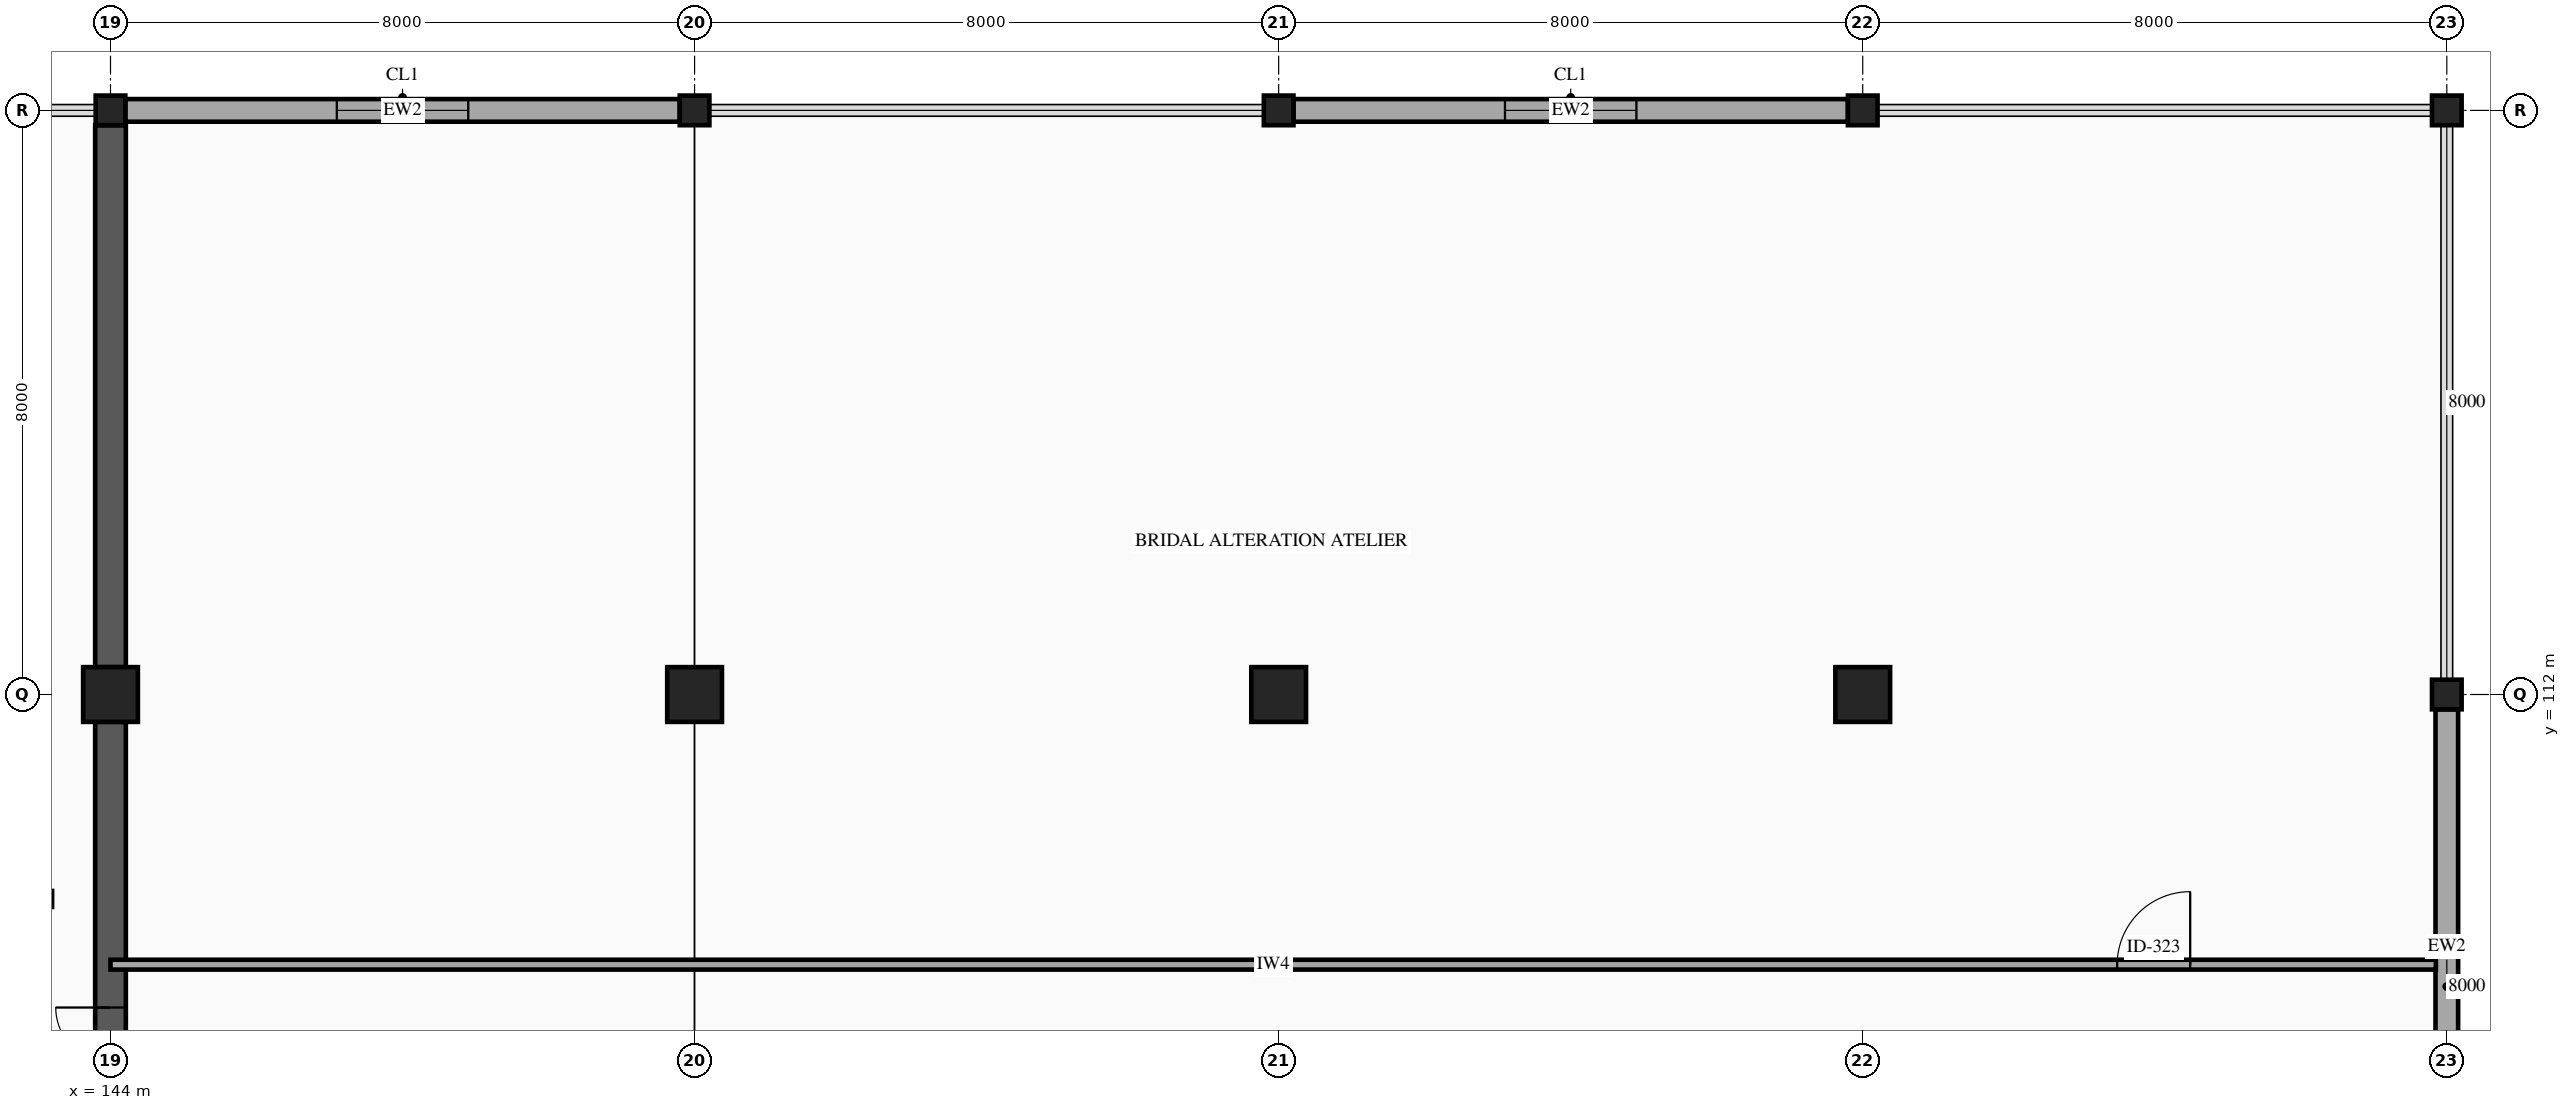
"""IFC4 building model, lengths in metres.
Left out: names, types, materials, properties, quantities, classifications, styles, units other than length and angle.
Written with IfcOpenShell. Run it as: python <this file> out.ifc"""

import sys

from ifc_helpers import new_model, si_unit, direction, frame, frame_2d, origin, origin_2d, place, context, subcontext, project, spatial, rectangle, hollow_rectangle, extrude, element, fill, save


model = new_model("IFC4")
c1 = context("Model", 3, precision=1e-05, world=origin(), true_north=direction((0.0, 1.0)))
c2 = subcontext(c1, "Body", "Model", "MODEL_VIEW")
j1 = project(units=[si_unit("LENGTHUNIT", "METRE"), si_unit("PLANEANGLEUNIT", "RADIAN")], contexts=[c1])
p1 = place(None, origin())
s1 = spatial("IfcSite", under=j1, at=p1, CompositionType="ELEMENT")
p2 = place(p1, origin())
s2 = spatial("IfcBuilding", under=s1, at=p2, CompositionType="ELEMENT")
p3 = place(p2, frame((0.0, 0.0, 10.4)))
s3 = spatial("IfcBuildingStorey", under=s2, at=p3, CompositionType="ELEMENT", Elevation=10.4)
p4 = place(p3, frame((144.0, 112.0, 0.0), z_axis=(0.0, 0.0, 1.0), x_axis=(1.0, 0.0, 0.0)))
e1 = element("IfcColumn", 1, at=p4, inside=s3, PredefinedType="COLUMN", context=c2, shape_type="SweptSolid", body=[
    extrude(rectangle(XDim=0.75, YDim=0.75, at=origin_2d()), origin(), (0.0, 0.0, 1.0), 4.5),
])
p5 = place(p3, frame((144.0, 120.0, 0.0), z_axis=(0.0, 0.0, 1.0), x_axis=(1.0, 0.0, 0.0)))
e2 = element("IfcColumn", 2, at=p5, inside=s3, PredefinedType="COLUMN", context=c2, shape_type="SweptSolid", body=[
    extrude(hollow_rectangle(XDim=0.406, YDim=0.406, WallThickness=0.015, InnerFilletRadius=0.015, OuterFilletRadius=0.029, at=origin_2d()), origin(), (0.0, 0.0, 1.0), 4.5),
])
p6 = place(p3, frame((152.0, 112.0, 0.0), z_axis=(0.0, 0.0, 1.0), x_axis=(1.0, 0.0, 0.0)))
e3 = element("IfcColumn", 3, at=p6, inside=s3, PredefinedType="COLUMN", context=c2, shape_type="SweptSolid", body=[
    extrude(rectangle(XDim=0.75, YDim=0.75, at=origin_2d()), origin(), (0.0, 0.0, 1.0), 4.5),
])
p7 = place(p3, frame((152.0, 120.0, 0.0), z_axis=(0.0, 0.0, 1.0), x_axis=(1.0, 0.0, 0.0)))
e4 = element("IfcColumn", 4, at=p7, inside=s3, PredefinedType="COLUMN", context=c2, shape_type="SweptSolid", body=[
    extrude(hollow_rectangle(XDim=0.406, YDim=0.406, WallThickness=0.015, InnerFilletRadius=0.015, OuterFilletRadius=0.029, at=origin_2d()), origin(), (0.0, 0.0, 1.0), 4.5),
])
p8 = place(p3, frame((160.0, 112.0, 0.0), z_axis=(0.0, 0.0, 1.0), x_axis=(1.0, 0.0, 0.0)))
e5 = element("IfcColumn", 5, at=p8, inside=s3, PredefinedType="COLUMN", context=c2, shape_type="SweptSolid", body=[
    extrude(rectangle(XDim=0.75, YDim=0.75, at=origin_2d()), origin(), (0.0, 0.0, 1.0), 4.5),
])
p9 = place(p3, frame((160.0, 120.0, 0.0), z_axis=(0.0, 0.0, 1.0), x_axis=(1.0, 0.0, 0.0)))
e6 = element("IfcColumn", 6, at=p9, inside=s3, PredefinedType="COLUMN", context=c2, shape_type="SweptSolid", body=[
    extrude(hollow_rectangle(XDim=0.406, YDim=0.406, WallThickness=0.015, InnerFilletRadius=0.015, OuterFilletRadius=0.029, at=origin_2d()), origin(), (0.0, 0.0, 1.0), 4.5),
])
p10 = place(p3, frame((168.0, 112.0, 0.0), z_axis=(0.0, 0.0, 1.0), x_axis=(1.0, 0.0, 0.0)))
e7 = element("IfcColumn", 7, at=p10, inside=s3, PredefinedType="COLUMN", context=c2, shape_type="SweptSolid", body=[
    extrude(rectangle(XDim=0.75, YDim=0.75, at=origin_2d()), origin(), (0.0, 0.0, 1.0), 4.5),
])
for number, where, z_axis, x_axis in (
    (8, (168.0, 120.0, 0.0), (0.0, 0.0, 1.0), (1.0, 0.0, 0.0)),
    (9, (176.0, 112.0, 0.0), (0.0, 0.0, 1.0), (1.0, 0.0, 0.0)),
    (10, (176.0, 120.0, 0.0), (0.0, 0.0, 1.0), (1.0, 0.0, 0.0)),
):
    element("IfcColumn", number, at=place(p3, frame(where, z_axis=z_axis, x_axis=x_axis)), inside=s3, PredefinedType="COLUMN", context=c2, shape_type="SweptSolid", body=[
        extrude(hollow_rectangle(XDim=0.406, YDim=0.406, WallThickness=0.015, InnerFilletRadius=0.015, OuterFilletRadius=0.029, at=origin_2d()), origin(), (0.0, 0.0, 1.0), 4.5),
    ])
p11 = place(p3, frame((144.203, 120.0, 0.0), z_axis=(0.0, 0.0, 1.0), x_axis=(1.0, 0.0, 0.0)))
e11 = element("IfcWall", 11, at=p11, inside=s3, PredefinedType="STANDARD", context=c2, shape_type="SweptSolid", body=[
    extrude(rectangle(XDim=7.594, YDim=0.31, at=frame_2d((3.797, 0.0))), origin(), (0.0, 0.0, 1.0), 3.48),
])
p12 = place(p11, frame((2.897, 0.0, 0.8)))
e12 = element("IfcOpeningElement", 12, at=p12, cuts=e11, PredefinedType="OPENING", context=c2, shape_type="SweptSolid", body=[
    extrude(rectangle(XDim=1.8, YDim=2.4, at=frame_2d((0.9, 1.2))), frame((0.0, 0.165, 0.0), z_axis=(0.0, -1.0, 0.0), x_axis=(1.0, 0.0, 0.0)), (0.0, 0.0, 1.0), 0.33),
])
p13 = place(p3, frame((160.203, 120.0, 0.0), z_axis=(0.0, 0.0, 1.0), x_axis=(1.0, 0.0, 0.0)))
e13 = element("IfcWall", 13, at=p13, inside=s3, PredefinedType="STANDARD", context=c2, shape_type="SweptSolid", body=[
    extrude(rectangle(XDim=7.594, YDim=0.31, at=frame_2d((3.797, 0.0))), origin(), (0.0, 0.0, 1.0), 3.48),
])
p14 = place(p13, frame((2.897, 0.0, 0.8)))
e14 = element("IfcOpeningElement", 14, at=p14, cuts=e13, PredefinedType="OPENING", context=c2, shape_type="SweptSolid", body=[
    extrude(rectangle(XDim=1.8, YDim=2.4, at=frame_2d((0.9, 1.2))), frame((0.0, 0.165, 0.0), z_axis=(0.0, -1.0, 0.0), x_axis=(1.0, 0.0, 0.0)), (0.0, 0.0, 1.0), 0.33),
])
p15 = place(p3, frame((176.0, 111.797, 0.0), z_axis=(0.0, 0.0, 1.0), x_axis=(0.0, -1.0, 0.0)))
e15 = element("IfcWall", 15, at=p15, inside=s3, PredefinedType="STANDARD", context=c2, shape_type="SweptSolid", body=[
    extrude(rectangle(XDim=7.594, YDim=0.31, at=frame_2d((3.797, 0.0))), origin(), (0.0, 0.0, 1.0), 3.48),
])
p16 = place(p3, frame((144.0, 104.375, 0.0), z_axis=(0.0, 0.0, 1.0), x_axis=(0.0, 1.0, 0.0)))
e16 = element("IfcWall", 16, at=p16, inside=s3, PredefinedType="SHEAR", context=c2, shape_type="SweptSolid", body=[
    extrude(rectangle(XDim=7.25, YDim=0.42, at=frame_2d((3.625, 0.0))), origin(), (0.0, 0.0, 1.0), 4.28),
])
p17 = place(p16, frame((1.838, 0.0, 0.0)))
e17 = element("IfcOpeningElement", 17, at=p17, cuts=e16, PredefinedType="OPENING", context=c2, shape_type="SweptSolid", body=[
    extrude(rectangle(XDim=1.5, YDim=2.15, at=frame_2d((0.75, 1.075))), frame((0.0, 0.22, 0.0), z_axis=(0.0, -1.0, 0.0), x_axis=(1.0, 0.0, 0.0)), (0.0, 0.0, 1.0), 0.44),
])
p18 = place(p3, frame((144.0, 112.375, 0.0), z_axis=(0.0, 0.0, 1.0), x_axis=(0.0, 1.0, 0.0)))
e18 = element("IfcWall", 18, at=p18, inside=s3, PredefinedType="SHEAR", context=c2, shape_type="SweptSolid", body=[
    extrude(rectangle(XDim=7.422, YDim=0.42, at=frame_2d((3.711, 0.0))), origin(), (0.0, 0.0, 1.0), 4.28),
])
p19 = place(p3, frame((144.0, 108.3, 0.0), z_axis=(0.0, 0.0, 1.0), x_axis=(1.0, 0.0, 0.0)))
e19 = element("IfcWall", 19, at=p19, inside=s3, PredefinedType="PARTITIONING", context=c2, shape_type="SweptSolid", body=[
    extrude(rectangle(XDim=31.85, YDim=0.135, at=frame_2d((15.925, 0.0))), origin(), (0.0, 0.0, 1.0), 3.48),
])
p20 = place(p19, frame((27.485, 0.0, 0.0)))
e20 = element("IfcOpeningElement", 20, at=p20, cuts=e19, PredefinedType="OPENING", context=c2, shape_type="SweptSolid", body=[
    extrude(rectangle(XDim=1.0, YDim=2.15, at=frame_2d((0.5, 1.075))), frame((0.0, 0.077, 0.0), z_axis=(0.0, -1.0, 0.0), x_axis=(1.0, 0.0, 0.0)), (0.0, 0.0, 1.0), 0.155),
])
p21 = place(p12, origin())
e21 = element("IfcWindow", 21, at=p21, inside=s3, PartitioningType="DOUBLE_PANEL_HORIZONTAL", PredefinedType="WINDOW", context=c2, shape_type="SweptSolid", body=[
    extrude(rectangle(XDim=1.8, YDim=2.4, at=frame_2d((0.9, 1.2))), frame((0.0, 0.03, 0.0), z_axis=(0.0, -1.0, 0.0), x_axis=(1.0, 0.0, 0.0)), (0.0, 0.0, 1.0), 0.06),
])
fill(e12, e21)
p22 = place(p14, origin())
e22 = element("IfcWindow", 22, at=p22, inside=s3, PartitioningType="DOUBLE_PANEL_HORIZONTAL", PredefinedType="WINDOW", context=c2, shape_type="SweptSolid", body=[
    extrude(rectangle(XDim=1.8, YDim=2.4, at=frame_2d((0.9, 1.2))), frame((0.0, 0.03, 0.0), z_axis=(0.0, -1.0, 0.0), x_axis=(1.0, 0.0, 0.0)), (0.0, 0.0, 1.0), 0.06),
])
fill(e14, e22)
p23 = place(p17, origin())
e23 = element("IfcDoor", 23, at=p23, inside=s3, OperationType="DOUBLE_DOOR_SINGLE_SWING", PredefinedType="DOOR", context=c2, shape_type="SweptSolid", body=[
    extrude(rectangle(XDim=1.5, YDim=2.15, at=frame_2d((0.75, 1.075))), frame((0.0, 0.025, 0.0), z_axis=(0.0, -1.0, 0.0), x_axis=(1.0, 0.0, 0.0)), (0.0, 0.0, 1.0), 0.05),
])
fill(e17, e23)
p24 = place(p20, origin())
e24 = element("IfcDoor", 24, at=p24, inside=s3, OperationType="SINGLE_SWING_RIGHT", PredefinedType="DOOR", context=c2, shape_type="SweptSolid", body=[
    extrude(rectangle(XDim=1.0, YDim=2.15, at=frame_2d((0.5, 1.075))), frame((0.0, 0.025, 0.0), z_axis=(0.0, -1.0, 0.0), x_axis=(1.0, 0.0, 0.0)), (0.0, 0.0, 1.0), 0.05),
])
fill(e20, e24)
save(model, sys.argv[1])
